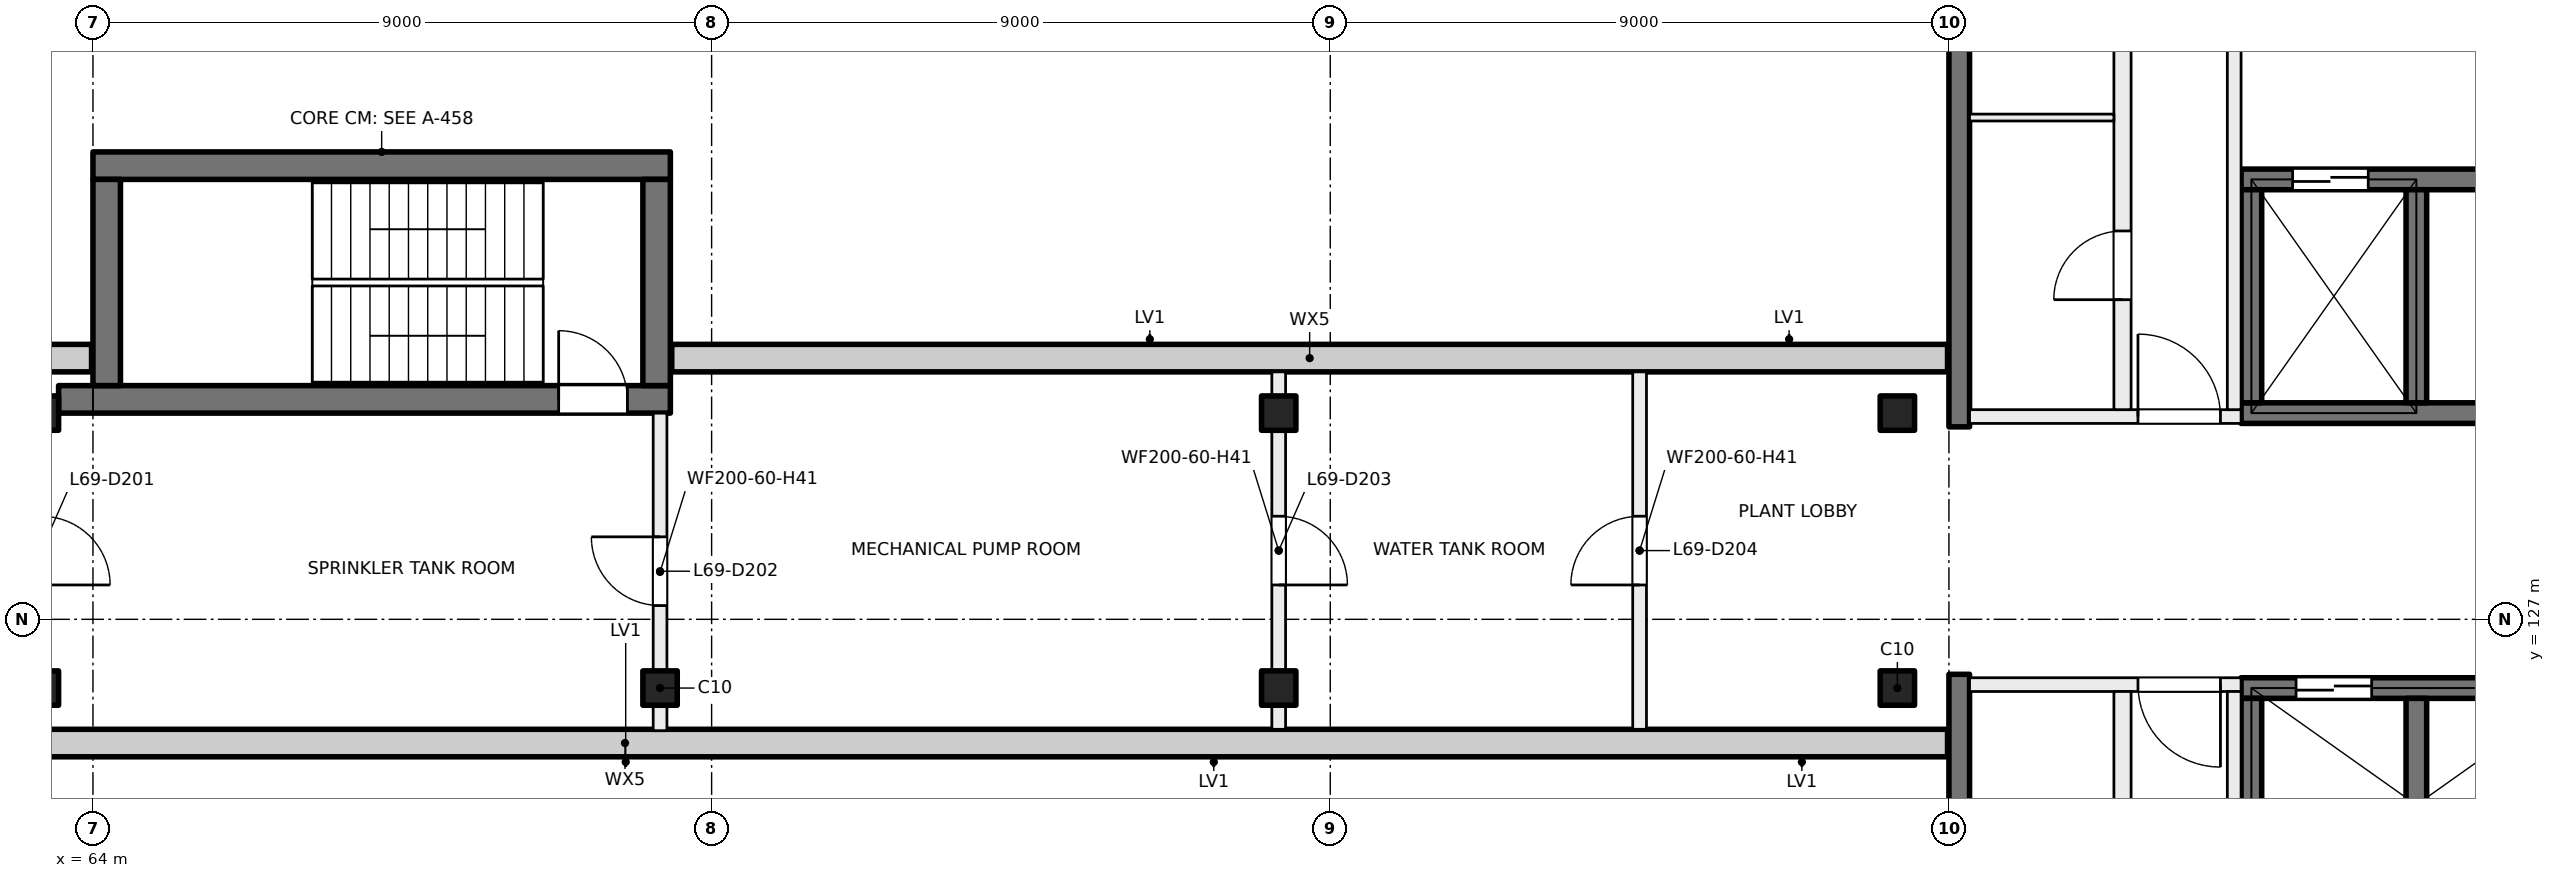
"""IFC4 building model, lengths in metres.
Left out: names, types, materials, properties, quantities, classifications, styles, units other than length and angle.
Written with IfcOpenShell. Run it as: python <this file> out.ifc"""

import sys

from ifc_helpers import new_model, si_unit, direction, frame, frame_2d, origin, origin_2d, place, context, subcontext, project, spatial, rectangle, extrude, element, fill, save


model = new_model("IFC4")
c1 = context("Model", 3, precision=1e-05, world=origin(), true_north=direction((0.0, 1.0)))
c2 = subcontext(c1, "Body", "Model", "MODEL_VIEW")
j1 = project(units=[si_unit("LENGTHUNIT", "METRE"), si_unit("PLANEANGLEUNIT", "RADIAN")], contexts=[c1])
p1 = place(None, origin())
s1 = spatial("IfcSite", under=j1, at=p1, CompositionType="ELEMENT")
p2 = place(p1, origin())
s2 = spatial("IfcBuilding", under=s1, at=p2, CompositionType="ELEMENT")
p3 = place(p2, frame((0.0, 0.0, 291.0)))
s3 = spatial("IfcBuildingStorey", under=s2, at=p3, CompositionType="ELEMENT", Elevation=291.0)
for number, where, z_axis, x_axis in (
    (1, (63.25, 130.0, 0.0), (0.0, 0.0, 1.0), (1.0, 0.0, 0.0)),
    (2, (81.25, 130.0, 0.0), (0.0, 0.0, 1.0), (1.0, 0.0, 0.0)),
    (3, (90.25, 130.0, 0.0), (0.0, 0.0, 1.0), (1.0, 0.0, 0.0)),
    (4, (63.25, 126.0, 0.0), (0.0, 0.0, 1.0), (1.0, 0.0, 0.0)),
    (5, (72.25, 126.0, 0.0), (0.0, 0.0, 1.0), (1.0, 0.0, 0.0)),
    (6, (81.25, 126.0, 0.0), (0.0, 0.0, 1.0), (1.0, 0.0, 0.0)),
    (7, (90.25, 126.0, 0.0), (0.0, 0.0, 1.0), (1.0, 0.0, 0.0)),
):
    element("IfcColumn", number, at=place(p3, frame(where, z_axis=z_axis, x_axis=x_axis)), inside=s3, PredefinedType="COLUMN", context=c2, shape_type="SweptSolid", body=[
        extrude(rectangle(XDim=0.5, YDim=0.5, at=origin_2d()), origin(), (0.0, 0.0, 1.0), 4.5),
    ])
p4 = place(p3, frame((107.55, 130.0, 0.0), z_axis=(0.0, 0.0, 1.0), x_axis=(-1.0, 0.0, 0.0)))
e8 = element("IfcWall", 8, at=p4, inside=s3, PredefinedType="SHEAR", context=c2, shape_type="SweptSolid", body=[
    extrude(rectangle(XDim=12.3, YDim=0.3, at=frame_2d((6.15, 0.0))), origin(), (0.0, 0.0, 1.0), 4.5),
])
p5 = place(p4, frame((0.95, 0.0, 0.0)))
e9 = element("IfcOpeningElement", 9, at=p5, cuts=e8, PredefinedType="OPENING", context=c2, shape_type="SweptSolid", body=[
    extrude(rectangle(XDim=0.8, YDim=2.1, at=frame_2d((0.4, 1.05))), frame((0.0, 0.16, 0.0), z_axis=(0.0, -1.0, 0.0), x_axis=(1.0, 0.0, 0.0)), (0.0, 0.0, 1.0), 0.32),
])
p6 = place(p4, frame((5.75, 0.0, 0.0)))
e10 = element("IfcOpeningElement", 10, at=p6, cuts=e8, PredefinedType="OPENING", context=c2, shape_type="SweptSolid", body=[
    extrude(rectangle(XDim=0.8, YDim=2.1, at=frame_2d((0.4, 1.05))), frame((0.0, 0.16, 0.0), z_axis=(0.0, -1.0, 0.0), x_axis=(1.0, 0.0, 0.0)), (0.0, 0.0, 1.0), 0.32),
])
p7 = place(p3, frame((107.55, 133.4, 0.0), z_axis=(0.0, 0.0, 1.0), x_axis=(-1.0, 0.0, 0.0)))
e11 = element("IfcWall", 11, at=p7, inside=s3, PredefinedType="SHEAR", context=c2, shape_type="SweptSolid", body=[
    extrude(rectangle(XDim=12.3, YDim=0.3, at=frame_2d((6.15, 0.0))), origin(), (0.0, 0.0, 1.0), 4.5),
])
p8 = place(p7, frame((10.45, 0.0, 0.0)))
e12 = element("IfcOpeningElement", 12, at=p8, cuts=e11, PredefinedType="OPENING", context=c2, shape_type="SweptSolid", body=[
    extrude(rectangle(XDim=1.1, YDim=2.1, at=frame_2d((0.55, 1.05))), frame((0.0, 0.16, 0.0), z_axis=(0.0, -1.0, 0.0), x_axis=(1.0, 0.0, 0.0)), (0.0, 0.0, 1.0), 0.32),
])
for number, where, z_axis, x_axis in (
    (13, (97.8, 133.25, 0.0), (0.0, 0.0, 1.0), (0.0, -1.0, 0.0)),
    (14, (95.4, 133.25, 0.0), (0.0, 0.0, 1.0), (0.0, -1.0, 0.0)),
):
    element("IfcWall", number, at=place(p3, frame(where, z_axis=z_axis, x_axis=x_axis)), inside=s3, PredefinedType="SHEAR", context=c2, shape_type="SweptSolid", body=[
        extrude(rectangle(XDim=3.1, YDim=0.3, at=frame_2d((1.55, 0.0))), origin(), (0.0, 0.0, 1.0), 4.5),
    ])
p9 = place(p3, frame((107.55, 126.0, 0.0), z_axis=(0.0, 0.0, 1.0), x_axis=(-1.0, 0.0, 0.0)))
e15 = element("IfcWall", 15, at=p9, inside=s3, PredefinedType="SHEAR", context=c2, shape_type="SweptSolid", body=[
    extrude(rectangle(XDim=12.3, YDim=0.3, at=frame_2d((6.15, 0.0))), origin(), (0.0, 0.0, 1.0), 4.5),
])
p10 = place(p9, frame((10.4, 0.0, 0.0)))
e16 = element("IfcOpeningElement", 16, at=p10, cuts=e15, PredefinedType="OPENING", context=c2, shape_type="SweptSolid", body=[
    extrude(rectangle(XDim=1.1, YDim=2.1, at=frame_2d((0.55, 1.05))), frame((0.0, 0.16, 0.0), z_axis=(0.0, -1.0, 0.0), x_axis=(1.0, 0.0, 0.0)), (0.0, 0.0, 1.0), 0.32),
])
p11 = place(p9, frame((0.95, 0.0, 0.0)))
e17 = element("IfcOpeningElement", 17, at=p11, cuts=e15, PredefinedType="OPENING", context=c2, shape_type="SweptSolid", body=[
    extrude(rectangle(XDim=0.8, YDim=2.1, at=frame_2d((0.4, 1.05))), frame((0.0, 0.16, 0.0), z_axis=(0.0, -1.0, 0.0), x_axis=(1.0, 0.0, 0.0)), (0.0, 0.0, 1.0), 0.32),
])
for number, where, z_axis, x_axis in (
    (18, (97.8, 125.85, 0.0), (0.0, 0.0, 1.0), (0.0, -1.0, 0.0)),
    (19, (95.4, 125.85, 0.0), (0.0, 0.0, 1.0), (0.0, -1.0, 0.0)),
):
    element("IfcWall", number, at=place(p3, frame(where, z_axis=z_axis, x_axis=x_axis)), inside=s3, PredefinedType="SHEAR", context=c2, shape_type="SweptSolid", body=[
        extrude(rectangle(XDim=3.1, YDim=0.3, at=frame_2d((1.55, 0.0))), origin(), (0.0, 0.0, 1.0), 4.5),
    ])
for number, where, z_axis, x_axis in (
    (20, (91.15, 138.55, 0.0), (0.0, 0.0, 1.0), (0.0, -1.0, 0.0)),
    (21, (91.15, 126.2, 0.0), (0.0, 0.0, 1.0), (0.0, -1.0, 0.0)),
):
    element("IfcWall", number, at=place(p3, frame(where, z_axis=z_axis, x_axis=x_axis)), inside=s3, PredefinedType="SHEAR", context=c2, shape_type="SweptSolid", body=[
        extrude(rectangle(XDim=8.75, YDim=0.3, at=frame_2d((4.375, 0.0))), origin(), (0.0, 0.0, 1.0), 4.5),
    ])
p12 = place(p3, frame((63.5, 130.2, 0.0), z_axis=(0.0, 0.0, 1.0), x_axis=(1.0, 0.0, 0.0)))
e22 = element("IfcWall", 22, at=p12, inside=s3, PredefinedType="SHEAR", context=c2, shape_type="SweptSolid", body=[
    extrude(rectangle(XDim=8.9, YDim=0.4, at=frame_2d((4.45, 0.0))), origin(), (0.0, 0.0, 1.0), 4.5),
])
p13 = place(p12, frame((7.275, 0.0, 0.0)))
e23 = element("IfcOpeningElement", 23, at=p13, cuts=e22, PredefinedType="OPENING", context=c2, shape_type="SweptSolid", body=[
    extrude(rectangle(XDim=1.0, YDim=2.1, at=frame_2d((0.5, 1.05))), frame((0.0, 0.21, 0.0), z_axis=(0.0, -1.0, 0.0), x_axis=(1.0, 0.0, 0.0)), (0.0, 0.0, 1.0), 0.42),
])
p14 = place(p3, frame((64.0, 133.6, 0.0), z_axis=(0.0, 0.0, 1.0), x_axis=(1.0, 0.0, 0.0)))
e24 = element("IfcWall", 24, at=p14, inside=s3, PredefinedType="SHEAR", context=c2, shape_type="SweptSolid", body=[
    extrude(rectangle(XDim=8.4, YDim=0.4, at=frame_2d((4.2, 0.0))), origin(), (0.0, 0.0, 1.0), 4.5),
])
for number, where, z_axis, x_axis in (
    (25, (64.2, 130.4, 0.0), (0.0, 0.0, 1.0), (0.0, 1.0, 0.0)),
    (26, (72.2, 130.4, 0.0), (0.0, 0.0, 1.0), (0.0, 1.0, 0.0)),
):
    element("IfcWall", number, at=place(p3, frame(where, z_axis=z_axis, x_axis=x_axis)), inside=s3, PredefinedType="SHEAR", context=c2, shape_type="SweptSolid", body=[
        extrude(rectangle(XDim=3.0, YDim=0.4, at=frame_2d((1.5, 0.0))), origin(), (0.0, 0.0, 1.0), 4.5),
    ])
p15 = place(p3, frame((52.5, 130.8, 0.0), z_axis=(0.0, 0.0, 1.0), x_axis=(1.0, 0.0, 0.0)))
e27 = element("IfcWall", 27, at=p15, inside=s3, PredefinedType="SOLIDWALL", context=c2, shape_type="SweptSolid", body=[
    extrude(rectangle(XDim=11.48, YDim=0.4, at=frame_2d((5.74, 0.0))), origin(), (0.0, 0.0, 1.0), 4.125),
])
p16 = place(p3, frame((90.98, 125.2, 0.0), z_axis=(0.0, 0.0, 1.0), x_axis=(-1.0, 0.0, 0.0)))
e28 = element("IfcWall", 28, at=p16, inside=s3, PredefinedType="SOLIDWALL", context=c2, shape_type="SweptSolid", body=[
    extrude(rectangle(XDim=38.48, YDim=0.4, at=frame_2d((19.24, 0.0))), origin(), (0.0, 0.0, 1.0), 4.125),
])
p17 = place(p3, frame((72.42, 130.8, 0.0), z_axis=(0.0, 0.0, 1.0), x_axis=(1.0, 0.0, 0.0)))
e29 = element("IfcWall", 29, at=p17, inside=s3, PredefinedType="SOLIDWALL", context=c2, shape_type="SweptSolid", body=[
    extrude(rectangle(XDim=18.56, YDim=0.4, at=frame_2d((9.28, 0.0))), origin(), (0.0, 0.0, 1.0), 4.125),
])
p18 = place(p3, frame((95.25, 126.05, 0.0), z_axis=(0.0, 0.0, 1.0), x_axis=(-1.0, 0.0, 0.0)))
e30 = element("IfcWall", 30, at=p18, inside=s3, PredefinedType="PARTITIONING", context=c2, shape_type="SweptSolid", body=[
    extrude(rectangle(XDim=3.95, YDim=0.2, at=frame_2d((1.975, 0.0))), origin(), (0.0, 0.0, 1.0), 4.125),
])
p19 = place(p18, frame((0.3, 0.0, 0.0)))
e31 = element("IfcOpeningElement", 31, at=p19, cuts=e30, PredefinedType="OPENING", context=c2, shape_type="SweptSolid", body=[
    extrude(rectangle(XDim=1.2, YDim=2.1, at=frame_2d((0.6, 1.05))), frame((0.0, 0.11, 0.0), z_axis=(0.0, -1.0, 0.0), x_axis=(1.0, 0.0, 0.0)), (0.0, 0.0, 1.0), 0.22),
])
p20 = place(p3, frame((95.15, 117.45, 0.0), z_axis=(0.0, 0.0, 1.0), x_axis=(0.0, 1.0, 0.0)))
e32 = element("IfcWall", 32, at=p20, inside=s3, PredefinedType="PARTITIONING", context=c2, shape_type="SweptSolid", body=[
    extrude(rectangle(XDim=8.5, YDim=0.2, at=frame_2d((4.25, 0.0))), origin(), (0.0, 0.0, 1.0), 4.125),
])
p21 = place(p20, frame((1.75, 0.0, 0.0)))
e33 = element("IfcOpeningElement", 33, at=p21, cuts=e32, PredefinedType="OPENING", context=c2, shape_type="SweptSolid", body=[
    extrude(rectangle(XDim=1.5, YDim=2.1, at=frame_2d((0.75, 1.05))), frame((0.0, 0.11, 0.0), z_axis=(0.0, -1.0, 0.0), x_axis=(1.0, 0.0, 0.0)), (0.0, 0.0, 1.0), 0.22),
])
p22 = place(p3, frame((93.525, 117.45, 0.0), z_axis=(0.0, 0.0, 1.0), x_axis=(0.0, 1.0, 0.0)))
e34 = element("IfcWall", 34, at=p22, inside=s3, PredefinedType="PARTITIONING", context=c2, shape_type="SweptSolid", body=[
    extrude(rectangle(XDim=8.5, YDim=0.25, at=frame_2d((4.25, 0.0))), origin(), (0.0, 0.0, 1.0), 4.125),
])
p23 = place(p22, frame((5.29, 0.0, 0.0)))
e35 = element("IfcOpeningElement", 35, at=p23, cuts=e34, PredefinedType="OPENING", context=c2, shape_type="SweptSolid", body=[
    extrude(rectangle(XDim=0.8, YDim=2.1, at=frame_2d((0.4, 1.05))), frame((0.0, 0.135, 0.0), z_axis=(0.0, -1.0, 0.0), x_axis=(1.0, 0.0, 0.0)), (0.0, 0.0, 1.0), 0.27),
])
p24 = place(p22, frame((0.99, 0.0, 0.0)))
e36 = element("IfcOpeningElement", 36, at=p24, cuts=e34, PredefinedType="OPENING", context=c2, shape_type="SweptSolid", body=[
    extrude(rectangle(XDim=0.8, YDim=2.1, at=frame_2d((0.4, 1.05))), frame((0.0, 0.135, 0.0), z_axis=(0.0, -1.0, 0.0), x_axis=(1.0, 0.0, 0.0)), (0.0, 0.0, 1.0), 0.27),
])
p25 = place(p3, frame((91.3, 129.95, 0.0), z_axis=(0.0, 0.0, 1.0), x_axis=(1.0, 0.0, 0.0)))
e37 = element("IfcWall", 37, at=p25, inside=s3, PredefinedType="PARTITIONING", context=c2, shape_type="SweptSolid", body=[
    extrude(rectangle(XDim=3.95, YDim=0.2, at=frame_2d((1.975, 0.0))), origin(), (0.0, 0.0, 1.0), 4.125),
])
p26 = place(p25, frame((2.45, 0.0, 0.0)))
e38 = element("IfcOpeningElement", 38, at=p26, cuts=e37, PredefinedType="OPENING", context=c2, shape_type="SweptSolid", body=[
    extrude(rectangle(XDim=1.2, YDim=2.1, at=frame_2d((0.6, 1.05))), frame((0.0, 0.11, 0.0), z_axis=(0.0, -1.0, 0.0), x_axis=(1.0, 0.0, 0.0)), (0.0, 0.0, 1.0), 0.22),
])
p27 = place(p3, frame((95.15, 130.05, 0.0), z_axis=(0.0, 0.0, 1.0), x_axis=(0.0, 1.0, 0.0)))
e39 = element("IfcWall", 39, at=p27, inside=s3, PredefinedType="PARTITIONING", context=c2, shape_type="SweptSolid", body=[
    extrude(rectangle(XDim=8.5, YDim=0.2, at=frame_2d((4.25, 0.0))), origin(), (0.0, 0.0, 1.0), 4.125),
])
p28 = place(p27, frame((5.25, 0.0, 0.0)))
e40 = element("IfcOpeningElement", 40, at=p28, cuts=e39, PredefinedType="OPENING", context=c2, shape_type="SweptSolid", body=[
    extrude(rectangle(XDim=1.5, YDim=2.1, at=frame_2d((0.75, 1.05))), frame((0.0, 0.11, 0.0), z_axis=(0.0, -1.0, 0.0), x_axis=(1.0, 0.0, 0.0)), (0.0, 0.0, 1.0), 0.22),
])
p29 = place(p3, frame((93.525, 130.05, 0.0), z_axis=(0.0, 0.0, 1.0), x_axis=(0.0, 1.0, 0.0)))
e41 = element("IfcWall", 41, at=p29, inside=s3, PredefinedType="PARTITIONING", context=c2, shape_type="SweptSolid", body=[
    extrude(rectangle(XDim=8.5, YDim=0.25, at=frame_2d((4.25, 0.0))), origin(), (0.0, 0.0, 1.0), 4.125),
])
p30 = place(p29, frame((1.6, 0.0, 0.0)))
e42 = element("IfcOpeningElement", 42, at=p30, cuts=e41, PredefinedType="OPENING", context=c2, shape_type="SweptSolid", body=[
    extrude(rectangle(XDim=1.0, YDim=2.1, at=frame_2d((0.5, 1.05))), frame((0.0, 0.135, 0.0), z_axis=(0.0, -1.0, 0.0), x_axis=(1.0, 0.0, 0.0)), (0.0, 0.0, 1.0), 0.27),
])
p31 = place(p29, frame((5.9, 0.0, 0.0)))
e43 = element("IfcOpeningElement", 43, at=p31, cuts=e41, PredefinedType="OPENING", context=c2, shape_type="SweptSolid", body=[
    extrude(rectangle(XDim=1.0, YDim=2.1, at=frame_2d((0.5, 1.05))), frame((0.0, 0.135, 0.0), z_axis=(0.0, -1.0, 0.0), x_axis=(1.0, 0.0, 0.0)), (0.0, 0.0, 1.0), 0.27),
])
p32 = place(p3, frame((91.3, 134.3, 0.0), z_axis=(0.0, 0.0, 1.0), x_axis=(1.0, 0.0, 0.0)))
e44 = element("IfcWall", 44, at=p32, inside=s3, PredefinedType="PARTITIONING", context=c2, shape_type="SweptSolid", body=[
    extrude(rectangle(XDim=2.1, YDim=0.1, at=frame_2d((1.05, 0.0))), origin(), (0.0, 0.0, 1.0), 4.125),
])
p33 = place(p3, frame((72.25, 130.0, 0.0), z_axis=(0.0, 0.0, 1.0), x_axis=(0.0, -1.0, 0.0)))
e45 = element("IfcWall", 45, at=p33, inside=s3, PredefinedType="PARTITIONING", context=c2, shape_type="SweptSolid", body=[
    extrude(rectangle(XDim=4.62, YDim=0.2, at=frame_2d((2.31, 0.0))), origin(), (0.0, 0.0, 1.0), 4.125),
])
p34 = place(p33, frame((1.8, 0.0, 0.0)))
e46 = element("IfcOpeningElement", 46, at=p34, cuts=e45, PredefinedType="OPENING", context=c2, shape_type="SweptSolid", body=[
    extrude(rectangle(XDim=1.0, YDim=2.1, at=frame_2d((0.5, 1.05))), frame((0.0, 0.11, 0.0), z_axis=(0.0, -1.0, 0.0), x_axis=(1.0, 0.0, 0.0)), (0.0, 0.0, 1.0), 0.22),
])
p35 = place(p3, frame((81.25, 130.6, 0.0), z_axis=(0.0, 0.0, 1.0), x_axis=(0.0, -1.0, 0.0)))
e47 = element("IfcWall", 47, at=p35, inside=s3, PredefinedType="PARTITIONING", context=c2, shape_type="SweptSolid", body=[
    extrude(rectangle(XDim=5.2, YDim=0.2, at=frame_2d((2.6, 0.0))), origin(), (0.0, 0.0, 1.0), 4.125),
])
p36 = place(p35, frame((2.1, 0.0, 0.0)))
e48 = element("IfcOpeningElement", 48, at=p36, cuts=e47, PredefinedType="OPENING", context=c2, shape_type="SweptSolid", body=[
    extrude(rectangle(XDim=1.0, YDim=2.1, at=frame_2d((0.5, 1.05))), frame((0.0, 0.11, 0.0), z_axis=(0.0, -1.0, 0.0), x_axis=(1.0, 0.0, 0.0)), (0.0, 0.0, 1.0), 0.22),
])
p37 = place(p3, frame((86.5, 125.4, 0.0), z_axis=(0.0, 0.0, 1.0), x_axis=(0.0, 1.0, 0.0)))
e49 = element("IfcWall", 49, at=p37, inside=s3, PredefinedType="PARTITIONING", context=c2, shape_type="SweptSolid", body=[
    extrude(rectangle(XDim=5.2, YDim=0.2, at=frame_2d((2.6, 0.0))), origin(), (0.0, 0.0, 1.0), 4.125),
])
p38 = place(p37, frame((2.1, 0.0, 0.0)))
e50 = element("IfcOpeningElement", 50, at=p38, cuts=e49, PredefinedType="OPENING", context=c2, shape_type="SweptSolid", body=[
    extrude(rectangle(XDim=1.0, YDim=2.1, at=frame_2d((0.5, 1.05))), frame((0.0, 0.11, 0.0), z_axis=(0.0, -1.0, 0.0), x_axis=(1.0, 0.0, 0.0)), (0.0, 0.0, 1.0), 0.22),
])
p39 = place(p10, origin())
e51 = element("IfcDoor", 51, at=p39, inside=s3, OperationType="DOUBLE_DOOR_SLIDING", PredefinedType="DOOR", context=c2, shape_type="SweptSolid", body=[
    extrude(rectangle(XDim=1.1, YDim=2.1, at=frame_2d((0.55, 1.05))), frame((0.0, 0.025, 0.0), z_axis=(0.0, -1.0, 0.0), x_axis=(1.0, 0.0, 0.0)), (0.0, 0.0, 1.0), 0.05),
])
fill(e16, e51)
p40 = place(p19, origin())
e52 = element("IfcDoor", 52, at=p40, inside=s3, OperationType="DOUBLE_DOOR_SINGLE_SWING", PredefinedType="DOOR", context=c2, shape_type="SweptSolid", body=[
    extrude(rectangle(XDim=1.2, YDim=2.1, at=frame_2d((0.6, 1.05))), frame((0.0, 0.025, 0.0), z_axis=(0.0, -1.0, 0.0), x_axis=(1.0, 0.0, 0.0)), (0.0, 0.0, 1.0), 0.05),
])
fill(e31, e52)
p41 = place(p26, origin())
e53 = element("IfcDoor", 53, at=p41, inside=s3, OperationType="DOUBLE_DOOR_SINGLE_SWING", PredefinedType="DOOR", context=c2, shape_type="SweptSolid", body=[
    extrude(rectangle(XDim=1.2, YDim=2.1, at=frame_2d((0.6, 1.05))), frame((0.0, 0.025, 0.0), z_axis=(0.0, -1.0, 0.0), x_axis=(1.0, 0.0, 0.0)), (0.0, 0.0, 1.0), 0.05),
])
fill(e38, e53)
p42 = place(p30, origin())
e54 = element("IfcDoor", 54, at=p42, inside=s3, OperationType="SINGLE_SWING_RIGHT", PredefinedType="DOOR", context=c2, shape_type="SweptSolid", body=[
    extrude(rectangle(XDim=1.0, YDim=2.1, at=frame_2d((0.5, 1.05))), frame((0.0, 0.025, 0.0), z_axis=(0.0, -1.0, 0.0), x_axis=(1.0, 0.0, 0.0)), (0.0, 0.0, 1.0), 0.05),
])
fill(e42, e54)
p43 = place(p8, origin())
e55 = element("IfcDoor", 55, at=p43, inside=s3, OperationType="DOUBLE_DOOR_SLIDING", PredefinedType="DOOR", context=c2, shape_type="SweptSolid", body=[
    extrude(rectangle(XDim=1.1, YDim=2.1, at=frame_2d((0.55, 1.05))), frame((0.0, 0.025, 0.0), z_axis=(0.0, -1.0, 0.0), x_axis=(1.0, 0.0, 0.0)), (0.0, 0.0, 1.0), 0.05),
])
fill(e12, e55)
p44 = place(p13, origin())
e56 = element("IfcDoor", 56, at=p44, inside=s3, OperationType="SINGLE_SWING_LEFT", PredefinedType="DOOR", context=c2, shape_type="SweptSolid", body=[
    extrude(rectangle(XDim=1.0, YDim=2.1, at=frame_2d((0.5, 1.05))), frame((0.0, 0.025, 0.0), z_axis=(0.0, -1.0, 0.0), x_axis=(1.0, 0.0, 0.0)), (0.0, 0.0, 1.0), 0.05),
])
fill(e23, e56)
p45 = place(p34, origin())
e57 = element("IfcDoor", 57, at=p45, inside=s3, OperationType="SINGLE_SWING_LEFT", PredefinedType="DOOR", context=c2, shape_type="SweptSolid", body=[
    extrude(rectangle(XDim=1.0, YDim=2.1, at=frame_2d((0.5, 1.05))), frame((0.0, 0.025, 0.0), z_axis=(0.0, -1.0, 0.0), x_axis=(1.0, 0.0, 0.0)), (0.0, 0.0, 1.0), 0.05),
])
fill(e46, e57)
p46 = place(p36, origin())
e58 = element("IfcDoor", 58, at=p46, inside=s3, OperationType="SINGLE_SWING_RIGHT", PredefinedType="DOOR", context=c2, shape_type="SweptSolid", body=[
    extrude(rectangle(XDim=1.0, YDim=2.1, at=frame_2d((0.5, 1.05))), frame((0.0, 0.025, 0.0), z_axis=(0.0, -1.0, 0.0), x_axis=(1.0, 0.0, 0.0)), (0.0, 0.0, 1.0), 0.05),
])
fill(e48, e58)
p47 = place(p38, origin())
e59 = element("IfcDoor", 59, at=p47, inside=s3, OperationType="SINGLE_SWING_LEFT", PredefinedType="DOOR", context=c2, shape_type="SweptSolid", body=[
    extrude(rectangle(XDim=1.0, YDim=2.1, at=frame_2d((0.5, 1.05))), frame((0.0, 0.025, 0.0), z_axis=(0.0, -1.0, 0.0), x_axis=(1.0, 0.0, 0.0)), (0.0, 0.0, 1.0), 0.05),
])
fill(e50, e59)
save(model, sys.argv[1])
